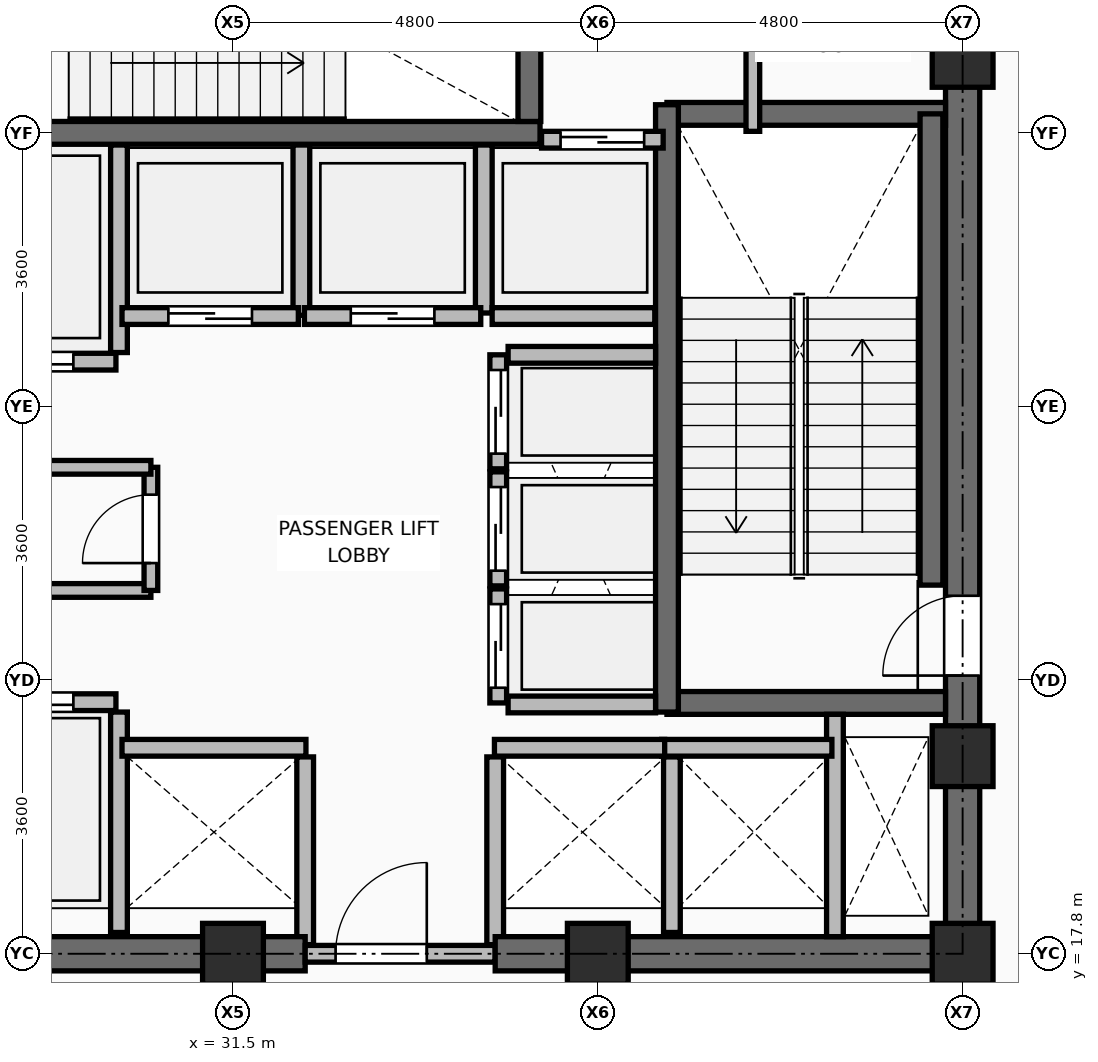
"""IFC4 building model, lengths in metres.
Left out: names, types, materials, properties, quantities, classifications, styles, units other than length and angle.
Written with IfcOpenShell. Run it as: python <this file> out.ifc"""

import sys

from ifc_helpers import new_model, si_unit, direction, frame, frame_2d, origin, origin_2d, place, context, subcontext, project, spatial, rectangle, extrude, element, fill, save


model = new_model("IFC4")
c1 = context("Model", 3, precision=1e-05, world=origin(), true_north=direction((0.0, 1.0)))
c2 = subcontext(c1, "Body", "Model", "MODEL_VIEW")
j1 = project(units=[si_unit("LENGTHUNIT", "METRE"), si_unit("PLANEANGLEUNIT", "RADIAN")], contexts=[c1])
p1 = place(None, origin())
s1 = spatial("IfcSite", under=j1, at=p1, CompositionType="ELEMENT")
p2 = place(p1, origin())
s2 = spatial("IfcBuilding", under=s1, at=p2, CompositionType="ELEMENT")
p3 = place(p2, frame((0.0, 0.0, 181.35)))
s3 = spatial("IfcBuildingStorey", under=s2, at=p3, CompositionType="ELEMENT", Elevation=181.35)
for number, where, z_axis, x_axis in (
    (1, (31.5, 17.8, 0.0), (0.0, 0.0, 1.0), (1.0, 0.0, 0.0)),
    (2, (36.3, 17.8, 0.0), (0.0, 0.0, 1.0), (1.0, 0.0, 0.0)),
    (3, (41.1, 17.8, 0.0), (0.0, 0.0, 1.0), (1.0, 0.0, 0.0)),
    (4, (41.1, 20.4, 0.0), (0.0, 0.0, 1.0), (1.0, 0.0, 0.0)),
    (5, (41.1, 29.6, 0.0), (0.0, 0.0, 1.0), (1.0, 0.0, 0.0)),
):
    element("IfcColumn", number, at=place(p3, frame(where, z_axis=z_axis, x_axis=x_axis)), inside=s3, PredefinedType="COLUMN", context=c2, shape_type="SweptSolid", body=[
        extrude(rectangle(XDim=0.8, YDim=0.8, at=origin_2d()), origin(), (0.0, 0.0, 1.0), 4.8),
    ])
p4 = place(p3, frame((30.0, 18.08, 0.0), z_axis=(0.0, 0.0, 1.0), x_axis=(0.0, 1.0, 0.0)))
e6 = element("IfcWall", 6, at=p4, inside=s3, PredefinedType="PARTITIONING", context=c2, shape_type="SweptSolid", body=[
    extrude(rectangle(XDim=2.9, YDim=0.22, at=frame_2d((1.45, 0.0))), origin(), (0.0, 0.0, 1.0), 4.595),
])
for number, where, z_axis, x_axis in (
    (7, (32.45, 17.92, 0.0), (0.0, 0.0, 1.0), (0.0, 1.0, 0.0)),
    (8, (34.95, 17.92, 0.0), (0.0, 0.0, 1.0), (0.0, 1.0, 0.0)),
):
    element("IfcWall", number, at=place(p3, frame(where, z_axis=z_axis, x_axis=x_axis)), inside=s3, PredefinedType="PARTITIONING", context=c2, shape_type="SweptSolid", body=[
        extrude(rectangle(XDim=2.47, YDim=0.22, at=frame_2d((1.235, 0.0))), origin(), (0.0, 0.0, 1.0), 4.595),
    ])
p5 = place(p3, frame((37.275, 18.08, 0.0), z_axis=(0.0, 0.0, 1.0), x_axis=(0.0, 1.0, 0.0)))
e9 = element("IfcWall", 9, at=p5, inside=s3, PredefinedType="PARTITIONING", context=c2, shape_type="SweptSolid", body=[
    extrude(rectangle(XDim=2.31, YDim=0.22, at=frame_2d((1.155, 0.0))), origin(), (0.0, 0.0, 1.0), 4.595),
])
p6 = place(p3, frame((30.0, 25.71, 0.0), z_axis=(0.0, 0.0, 1.0), x_axis=(0.0, 1.0, 0.0)))
e10 = element("IfcWall", 10, at=p6, inside=s3, PredefinedType="PARTITIONING", context=c2, shape_type="SweptSolid", body=[
    extrude(rectangle(XDim=2.73, YDim=0.22, at=frame_2d((1.365, 0.0))), origin(), (0.0, 0.0, 1.0), 4.595),
])
p7 = place(p3, frame((32.4, 26.2, 0.0), z_axis=(0.0, 0.0, 1.0), x_axis=(0.0, 1.0, 0.0)))
e11 = element("IfcWall", 11, at=p7, inside=s3, PredefinedType="PARTITIONING", context=c2, shape_type="SweptSolid", body=[
    extrude(rectangle(XDim=2.24, YDim=0.22, at=frame_2d((1.12, 0.0))), origin(), (0.0, 0.0, 1.0), 4.595),
])
p8 = place(p3, frame((34.8, 26.23, 0.0), z_axis=(0.0, 0.0, 1.0), x_axis=(0.0, 1.0, 0.0)))
e12 = element("IfcWall", 12, at=p8, inside=s3, PredefinedType="PARTITIONING", context=c2, shape_type="SweptSolid", body=[
    extrude(rectangle(XDim=2.21, YDim=0.22, at=frame_2d((1.105, 0.0))), origin(), (0.0, 0.0, 1.0), 4.595),
])
p9 = place(p3, frame((34.91, 26.19, 0.0), z_axis=(0.0, 0.0, 1.0), x_axis=(1.0, 0.0, 0.0)))
e13 = element("IfcWall", 13, at=p9, inside=s3, PredefinedType="PARTITIONING", context=c2, shape_type="SweptSolid", body=[
    extrude(rectangle(XDim=2.14, YDim=0.22, at=frame_2d((1.07, 0.0))), origin(), (0.0, 0.0, 1.0), 4.595),
])
p10 = place(p3, frame((25.55, 17.8, 0.0), z_axis=(0.0, 0.0, 1.0), x_axis=(1.0, 0.0, 0.0)))
e14 = element("IfcWall", 14, at=p10, inside=s3, PredefinedType="SHEAR", context=c2, shape_type="SweptSolid", body=[
    extrude(rectangle(XDim=6.9, YDim=0.45, at=frame_2d((3.45, 0.0))), origin(), (0.0, 0.0, 1.0), 4.62),
])
p11 = place(p3, frame((32.45, 17.8, 0.0), z_axis=(0.0, 0.0, 1.0), x_axis=(1.0, 0.0, 0.0)))
e15 = element("IfcWall", 15, at=p11, inside=s3, PredefinedType="PARTITIONING", context=c2, shape_type="SweptSolid", body=[
    extrude(rectangle(XDim=2.5, YDim=0.22, at=frame_2d((1.25, 0.0))), origin(), (0.0, 0.0, 1.0), 4.131),
])
p12 = place(p11, frame((0.4, 0.0, 0.0)))
e16 = element("IfcOpeningElement", 16, at=p12, cuts=e15, PredefinedType="OPENING", context=c2, shape_type="SweptSolid", body=[
    extrude(rectangle(XDim=1.2, YDim=2.1, at=frame_2d((0.6, 1.05))), frame((0.0, 0.12, 0.0), z_axis=(0.0, -1.0, 0.0), x_axis=(1.0, 0.0, 0.0)), (0.0, 0.0, 1.0), 0.24),
])
p13 = place(p3, frame((34.95, 17.8, 0.0), z_axis=(0.0, 0.0, 1.0), x_axis=(1.0, 0.0, 0.0)))
e17 = element("IfcWall", 17, at=p13, inside=s3, PredefinedType="SHEAR", context=c2, shape_type="SweptSolid", body=[
    extrude(rectangle(XDim=6.375, YDim=0.45, at=frame_2d((3.188, 0.0))), origin(), (0.0, 0.0, 1.0), 4.62),
])
p14 = place(p3, frame((41.1, 18.025, 0.0), z_axis=(0.0, 0.0, 1.0), x_axis=(0.0, 1.0, 0.0)))
e18 = element("IfcWall", 18, at=p14, inside=s3, PredefinedType="SHEAR", context=c2, shape_type="SweptSolid", body=[
    extrude(rectangle(XDim=14.2, YDim=0.45, at=frame_2d((7.1, 0.0))), origin(), (0.0, 0.0, 1.0), 4.62),
])
p15 = place(p14, frame((3.435, 0.0, 0.0)))
e19 = element("IfcOpeningElement", 19, at=p15, cuts=e18, PredefinedType="OPENING", context=c2, shape_type="SweptSolid", body=[
    extrude(rectangle(XDim=1.05, YDim=2.1, at=frame_2d((0.525, 1.05))), frame((0.0, 0.235, 0.0), z_axis=(0.0, -1.0, 0.0), x_axis=(1.0, 0.0, 0.0)), (0.0, 0.0, 1.0), 0.47),
])
for number, where, z_axis, x_axis in (
    (20, (37.21, 21.1, 0.0), (0.0, 0.0, 1.0), (1.0, 0.0, 0.0)),
    (21, (37.21, 28.85, 0.0), (0.0, 0.0, 1.0), (1.0, 0.0, 0.0)),
):
    element("IfcWall", number, at=place(p3, frame(where, z_axis=z_axis, x_axis=x_axis)), inside=s3, PredefinedType="SHEAR", context=c2, shape_type="SweptSolid", body=[
        extrude(rectangle(XDim=3.665, YDim=0.3, at=frame_2d((1.833, 0.0))), origin(), (0.0, 0.0, 1.0), 4.62),
    ])
p16 = place(p3, frame((37.21, 20.98, 0.0), z_axis=(0.0, 0.0, 1.0), x_axis=(0.0, 1.0, 0.0)))
e22 = element("IfcWall", 22, at=p16, inside=s3, PredefinedType="SHEAR", context=c2, shape_type="SweptSolid", body=[
    extrude(rectangle(XDim=7.99, YDim=0.3, at=frame_2d((3.995, 0.0))), origin(), (0.0, 0.0, 1.0), 4.62),
])
p17 = place(p3, frame((40.69, 22.65, 0.0), z_axis=(0.0, 0.0, 1.0), x_axis=(0.0, 1.0, 0.0)))
e23 = element("IfcWall", 23, at=p17, inside=s3, PredefinedType="SHEAR", context=c2, shape_type="SweptSolid", body=[
    extrude(rectangle(XDim=6.2, YDim=0.3, at=frame_2d((3.1, 0.0))), origin(), (0.0, 0.0, 1.0), 4.62),
])
p18 = place(p3, frame((27.51, 28.6, 0.0), z_axis=(0.0, 0.0, 1.0), x_axis=(1.0, 0.0, 0.0)))
e24 = element("IfcWall", 24, at=p18, inside=s3, PredefinedType="SHEAR", context=c2, shape_type="SweptSolid", body=[
    extrude(rectangle(XDim=8.03, YDim=0.3, at=frame_2d((4.015, 0.0))), origin(), (0.0, 0.0, 1.0), 4.62),
])
p19 = place(p3, frame((35.4, 28.75, 0.0), z_axis=(0.0, 0.0, 1.0), x_axis=(0.0, 1.0, 0.0)))
e25 = element("IfcWall", 25, at=p19, inside=s3, PredefinedType="SHEAR", context=c2, shape_type="SweptSolid", body=[
    extrude(rectangle(XDim=3.475, YDim=0.3, at=frame_2d((1.738, 0.0))), origin(), (0.0, 0.0, 1.0), 4.62),
])
p20 = place(p3, frame((39.42, 18.025, 0.0), z_axis=(0.0, 0.0, 1.0), x_axis=(0.0, 1.0, 0.0)))
e26 = element("IfcWall", 26, at=p20, inside=s3, PredefinedType="PARTITIONING", context=c2, shape_type="SweptSolid", body=[
    extrude(rectangle(XDim=2.925, YDim=0.22, at=frame_2d((1.462, 0.0))), origin(), (0.0, 0.0, 1.0), 4.6),
])
p21 = place(p3, frame((27.74, 21.11, 0.0), z_axis=(0.0, 0.0, 1.0), x_axis=(1.0, 0.0, 0.0)))
e27 = element("IfcWall", 27, at=p21, inside=s3, PredefinedType="PARTITIONING", context=c2, shape_type="SweptSolid", body=[
    extrude(rectangle(XDim=2.22, YDim=0.22, at=frame_2d((1.11, 0.0))), origin(), (0.0, 0.0, 1.0), 4.6),
])
p22 = place(p21, frame((0.56, 0.0, 0.0)))
e28 = element("IfcOpeningElement", 28, at=p22, cuts=e27, PredefinedType="OPENING", context=c2, shape_type="SweptSolid", body=[
    extrude(rectangle(XDim=1.1, YDim=2.2, at=frame_2d((0.55, 1.1))), frame((0.0, 0.12, 0.0), z_axis=(0.0, -1.0, 0.0), x_axis=(1.0, 0.0, 0.0)), (0.0, 0.0, 1.0), 0.24),
])
p23 = place(p3, frame((27.74, 25.59, 0.0), z_axis=(0.0, 0.0, 1.0), x_axis=(1.0, 0.0, 0.0)))
e29 = element("IfcWall", 29, at=p23, inside=s3, PredefinedType="PARTITIONING", context=c2, shape_type="SweptSolid", body=[
    extrude(rectangle(XDim=2.22, YDim=0.22, at=frame_2d((1.11, 0.0))), origin(), (0.0, 0.0, 1.0), 4.6),
])
p24 = place(p23, frame((0.56, 0.0, 0.0)))
e30 = element("IfcOpeningElement", 30, at=p24, cuts=e29, PredefinedType="OPENING", context=c2, shape_type="SweptSolid", body=[
    extrude(rectangle(XDim=1.1, YDim=2.2, at=frame_2d((0.55, 1.1))), frame((0.0, 0.12, 0.0), z_axis=(0.0, -1.0, 0.0), x_axis=(1.0, 0.0, 0.0)), (0.0, 0.0, 1.0), 0.24),
])
p25 = place(p3, frame((30.04, 20.51, 0.0), z_axis=(0.0, 0.0, 1.0), x_axis=(1.0, 0.0, 0.0)))
e31 = element("IfcWall", 31, at=p25, inside=s3, PredefinedType="PARTITIONING", context=c2, shape_type="SweptSolid", body=[
    extrude(rectangle(XDim=2.42, YDim=0.22, at=frame_2d((1.21, 0.0))), origin(), (0.0, 0.0, 1.0), 4.6),
])
for number, where, z_axis, x_axis in (
    (32, (37.14, 20.51, 0.0), (0.0, 0.0, 1.0), (1.0, 0.0, 0.0)),
    (33, (34.94, 20.51, 0.0), (0.0, 0.0, 1.0), (1.0, 0.0, 0.0)),
):
    element("IfcWall", number, at=place(p3, frame(where, z_axis=z_axis, x_axis=x_axis)), inside=s3, PredefinedType="PARTITIONING", context=c2, shape_type="SweptSolid", body=[
        extrude(rectangle(XDim=2.24, YDim=0.22, at=frame_2d((1.12, 0.0))), origin(), (0.0, 0.0, 1.0), 4.6),
    ])
p26 = place(p3, frame((30.04, 26.19, 0.0), z_axis=(0.0, 0.0, 1.0), x_axis=(1.0, 0.0, 0.0)))
e34 = element("IfcWall", 34, at=p26, inside=s3, PredefinedType="PARTITIONING", context=c2, shape_type="SweptSolid", body=[
    extrude(rectangle(XDim=2.32, YDim=0.22, at=frame_2d((1.16, 0.0))), origin(), (0.0, 0.0, 1.0), 4.6),
])
p27 = place(p26, frame((0.61, 0.0, 0.0)))
e35 = element("IfcOpeningElement", 35, at=p27, cuts=e34, PredefinedType="OPENING", context=c2, shape_type="SweptSolid", body=[
    extrude(rectangle(XDim=1.1, YDim=2.2, at=frame_2d((0.55, 1.1))), frame((0.0, 0.12, 0.0), z_axis=(0.0, -1.0, 0.0), x_axis=(1.0, 0.0, 0.0)), (0.0, 0.0, 1.0), 0.24),
])
p28 = place(p3, frame((32.44, 26.19, 0.0), z_axis=(0.0, 0.0, 1.0), x_axis=(1.0, 0.0, 0.0)))
e36 = element("IfcWall", 36, at=p28, inside=s3, PredefinedType="PARTITIONING", context=c2, shape_type="SweptSolid", body=[
    extrude(rectangle(XDim=2.32, YDim=0.22, at=frame_2d((1.16, 0.0))), origin(), (0.0, 0.0, 1.0), 4.6),
])
p29 = place(p28, frame((0.61, 0.0, 0.0)))
e37 = element("IfcOpeningElement", 37, at=p29, cuts=e36, PredefinedType="OPENING", context=c2, shape_type="SweptSolid", body=[
    extrude(rectangle(XDim=1.1, YDim=2.2, at=frame_2d((0.55, 1.1))), frame((0.0, 0.12, 0.0), z_axis=(0.0, -1.0, 0.0), x_axis=(1.0, 0.0, 0.0)), (0.0, 0.0, 1.0), 0.24),
])
p30 = place(p3, frame((35.56, 28.51, 0.0), z_axis=(0.0, 0.0, 1.0), x_axis=(1.0, 0.0, 0.0)))
e38 = element("IfcWall", 38, at=p30, inside=s3, PredefinedType="PARTITIONING", context=c2, shape_type="SweptSolid", body=[
    extrude(rectangle(XDim=1.6, YDim=0.22, at=frame_2d((0.8, 0.0))), origin(), (0.0, 0.0, 1.0), 4.6),
])
p31 = place(p30, frame((0.25, 0.0, 0.0)))
e39 = element("IfcOpeningElement", 39, at=p31, cuts=e38, PredefinedType="OPENING", context=c2, shape_type="SweptSolid", body=[
    extrude(rectangle(XDim=1.1, YDim=2.2, at=frame_2d((0.55, 1.1))), frame((0.0, 0.12, 0.0), z_axis=(0.0, -1.0, 0.0), x_axis=(1.0, 0.0, 0.0)), (0.0, 0.0, 1.0), 0.24),
])
p32 = place(p3, frame((34.99, 21.1, 0.0), z_axis=(0.0, 0.0, 1.0), x_axis=(0.0, 1.0, 0.0)))
e40 = element("IfcWall", 40, at=p32, inside=s3, PredefinedType="PARTITIONING", context=c2, shape_type="SweptSolid", body=[
    extrude(rectangle(XDim=1.5, YDim=0.22, at=frame_2d((0.75, 0.0))), origin(), (0.0, 0.0, 1.0), 4.6),
])
p33 = place(p32, frame((0.2, 0.0, 0.0)))
e41 = element("IfcOpeningElement", 41, at=p33, cuts=e40, PredefinedType="OPENING", context=c2, shape_type="SweptSolid", body=[
    extrude(rectangle(XDim=1.1, YDim=2.2, at=frame_2d((0.55, 1.1))), frame((0.0, 0.12, 0.0), z_axis=(0.0, -1.0, 0.0), x_axis=(1.0, 0.0, 0.0)), (0.0, 0.0, 1.0), 0.24),
])
p34 = place(p3, frame((34.99, 22.64, 0.0), z_axis=(0.0, 0.0, 1.0), x_axis=(0.0, 1.0, 0.0)))
e42 = element("IfcWall", 42, at=p34, inside=s3, PredefinedType="PARTITIONING", context=c2, shape_type="SweptSolid", body=[
    extrude(rectangle(XDim=1.5, YDim=0.22, at=frame_2d((0.75, 0.0))), origin(), (0.0, 0.0, 1.0), 4.6),
])
p35 = place(p34, frame((0.2, 0.0, 0.0)))
e43 = element("IfcOpeningElement", 43, at=p35, cuts=e42, PredefinedType="OPENING", context=c2, shape_type="SweptSolid", body=[
    extrude(rectangle(XDim=1.1, YDim=2.2, at=frame_2d((0.55, 1.1))), frame((0.0, 0.12, 0.0), z_axis=(0.0, -1.0, 0.0), x_axis=(1.0, 0.0, 0.0)), (0.0, 0.0, 1.0), 0.24),
])
p36 = place(p3, frame((34.99, 24.18, 0.0), z_axis=(0.0, 0.0, 1.0), x_axis=(0.0, 1.0, 0.0)))
e44 = element("IfcWall", 44, at=p36, inside=s3, PredefinedType="PARTITIONING", context=c2, shape_type="SweptSolid", body=[
    extrude(rectangle(XDim=1.5, YDim=0.22, at=frame_2d((0.75, 0.0))), origin(), (0.0, 0.0, 1.0), 4.6),
])
p37 = place(p36, frame((0.2, 0.0, 0.0)))
e45 = element("IfcOpeningElement", 45, at=p37, cuts=e44, PredefinedType="OPENING", context=c2, shape_type="SweptSolid", body=[
    extrude(rectangle(XDim=1.1, YDim=2.2, at=frame_2d((0.55, 1.1))), frame((0.0, 0.12, 0.0), z_axis=(0.0, -1.0, 0.0), x_axis=(1.0, 0.0, 0.0)), (0.0, 0.0, 1.0), 0.24),
])
for number, where, z_axis, x_axis in (
    (46, (35.12, 21.08, 0.0), (0.0, 0.0, 1.0), (1.0, 0.0, 0.0)),
    (47, (35.12, 25.68, 0.0), (0.0, 0.0, 1.0), (1.0, 0.0, 0.0)),
):
    element("IfcWall", number, at=place(p3, frame(where, z_axis=z_axis, x_axis=x_axis)), inside=s3, PredefinedType="PARTITIONING", context=c2, shape_type="SweptSolid", body=[
        extrude(rectangle(XDim=1.94, YDim=0.22, at=frame_2d((0.97, 0.0))), origin(), (0.0, 0.0, 1.0), 4.6),
    ])
p38 = place(p3, frame((27.68, 22.58, 0.0), z_axis=(0.0, 0.0, 1.0), x_axis=(1.0, 0.0, 0.0)))
e48 = element("IfcWall", 48, at=p38, inside=s3, PredefinedType="PARTITIONING", context=c2, shape_type="SweptSolid", body=[
    extrude(rectangle(XDim=2.74, YDim=0.18, at=frame_2d((1.37, 0.0))), origin(), (0.0, 0.0, 1.0), 4.6),
])
p39 = place(p3, frame((30.42, 22.58, 0.0), z_axis=(0.0, 0.0, 1.0), x_axis=(0.0, 1.0, 0.0)))
e49 = element("IfcWall", 49, at=p39, inside=s3, PredefinedType="PARTITIONING", context=c2, shape_type="SweptSolid", body=[
    extrude(rectangle(XDim=1.62, YDim=0.18, at=frame_2d((0.81, 0.0))), origin(), (0.0, 0.0, 1.0), 4.6),
])
p40 = place(p39, frame((0.36, 0.0, 0.0)))
e50 = element("IfcOpeningElement", 50, at=p40, cuts=e49, PredefinedType="OPENING", context=c2, shape_type="SweptSolid", body=[
    extrude(rectangle(XDim=0.9, YDim=2.1, at=frame_2d((0.45, 1.05))), frame((0.0, 0.1, 0.0), z_axis=(0.0, -1.0, 0.0), x_axis=(1.0, 0.0, 0.0)), (0.0, 0.0, 1.0), 0.2),
])
p41 = place(p3, frame((27.68, 24.2, 0.0), z_axis=(0.0, 0.0, 1.0), x_axis=(1.0, 0.0, 0.0)))
e51 = element("IfcWall", 51, at=p41, inside=s3, PredefinedType="PARTITIONING", context=c2, shape_type="SweptSolid", body=[
    extrude(rectangle(XDim=2.74, YDim=0.18, at=frame_2d((1.37, 0.0))), origin(), (0.0, 0.0, 1.0), 4.6),
])
p42 = place(p3, frame((38.34, 28.62, 0.0), z_axis=(0.0, 0.0, 1.0), x_axis=(0.0, 1.0, 0.0)))
e52 = element("IfcWall", 52, at=p42, inside=s3, PredefinedType="PARTITIONING", context=c2, shape_type="SweptSolid", body=[
    extrude(rectangle(XDim=3.605, YDim=0.18, at=frame_2d((1.802, 0.0))), origin(), (0.0, 0.0, 1.0), 4.6),
])
p43 = place(p12, origin())
e53 = element("IfcDoor", 53, at=p43, inside=s3, OperationType="SINGLE_SWING_RIGHT", PredefinedType="DOOR", context=c2, shape_type="SweptSolid", body=[
    extrude(rectangle(XDim=1.2, YDim=2.1, at=frame_2d((0.6, 1.05))), frame((0.0, 0.025, 0.0), z_axis=(0.0, -1.0, 0.0), x_axis=(1.0, 0.0, 0.0)), (0.0, 0.0, 1.0), 0.05),
])
fill(e16, e53)
p44 = place(p15, origin())
e54 = element("IfcDoor", 54, at=p44, inside=s3, OperationType="SINGLE_SWING_LEFT", PredefinedType="DOOR", context=c2, shape_type="SweptSolid", body=[
    extrude(rectangle(XDim=1.05, YDim=2.1, at=frame_2d((0.525, 1.05))), frame((0.0, 0.025, 0.0), z_axis=(0.0, -1.0, 0.0), x_axis=(1.0, 0.0, 0.0)), (0.0, 0.0, 1.0), 0.05),
])
fill(e19, e54)
p45 = place(p22, origin())
e55 = element("IfcDoor", 55, at=p45, inside=s3, OperationType="DOUBLE_DOOR_SLIDING", PredefinedType="DOOR", context=c2, shape_type="SweptSolid", body=[
    extrude(rectangle(XDim=1.1, YDim=2.2, at=frame_2d((0.55, 1.1))), frame((0.0, 0.025, 0.0), z_axis=(0.0, -1.0, 0.0), x_axis=(1.0, 0.0, 0.0)), (0.0, 0.0, 1.0), 0.05),
])
fill(e28, e55)
p46 = place(p24, frame((1.1, 0.0, 0.0), z_axis=(0.0, 0.0, 1.0), x_axis=(-1.0, 0.0, 0.0)))
e56 = element("IfcDoor", 56, at=p46, inside=s3, OperationType="DOUBLE_DOOR_SLIDING", PredefinedType="DOOR", context=c2, shape_type="SweptSolid", body=[
    extrude(rectangle(XDim=1.1, YDim=2.2, at=frame_2d((0.55, 1.1))), frame((0.0, 0.025, 0.0), z_axis=(0.0, -1.0, 0.0), x_axis=(1.0, 0.0, 0.0)), (0.0, 0.0, 1.0), 0.05),
])
fill(e30, e56)
p47 = place(p27, frame((1.1, 0.0, 0.0), z_axis=(0.0, 0.0, 1.0), x_axis=(-1.0, 0.0, 0.0)))
e57 = element("IfcDoor", 57, at=p47, inside=s3, OperationType="DOUBLE_DOOR_SLIDING", PredefinedType="DOOR", context=c2, shape_type="SweptSolid", body=[
    extrude(rectangle(XDim=1.1, YDim=2.2, at=frame_2d((0.55, 1.1))), frame((0.0, 0.025, 0.0), z_axis=(0.0, -1.0, 0.0), x_axis=(1.0, 0.0, 0.0)), (0.0, 0.0, 1.0), 0.05),
])
fill(e35, e57)
p48 = place(p29, frame((1.1, 0.0, 0.0), z_axis=(0.0, 0.0, 1.0), x_axis=(-1.0, 0.0, 0.0)))
e58 = element("IfcDoor", 58, at=p48, inside=s3, OperationType="DOUBLE_DOOR_SLIDING", PredefinedType="DOOR", context=c2, shape_type="SweptSolid", body=[
    extrude(rectangle(XDim=1.1, YDim=2.2, at=frame_2d((0.55, 1.1))), frame((0.0, 0.025, 0.0), z_axis=(0.0, -1.0, 0.0), x_axis=(1.0, 0.0, 0.0)), (0.0, 0.0, 1.0), 0.05),
])
fill(e37, e58)
p49 = place(p31, origin())
e59 = element("IfcDoor", 59, at=p49, inside=s3, OperationType="DOUBLE_DOOR_SLIDING", PredefinedType="DOOR", context=c2, shape_type="SweptSolid", body=[
    extrude(rectangle(XDim=1.1, YDim=2.2, at=frame_2d((0.55, 1.1))), frame((0.0, 0.025, 0.0), z_axis=(0.0, -1.0, 0.0), x_axis=(1.0, 0.0, 0.0)), (0.0, 0.0, 1.0), 0.05),
])
fill(e39, e59)
p50 = place(p33, origin())
e60 = element("IfcDoor", 60, at=p50, inside=s3, OperationType="DOUBLE_DOOR_SLIDING", PredefinedType="DOOR", context=c2, shape_type="SweptSolid", body=[
    extrude(rectangle(XDim=1.1, YDim=2.2, at=frame_2d((0.55, 1.1))), frame((0.0, 0.025, 0.0), z_axis=(0.0, -1.0, 0.0), x_axis=(1.0, 0.0, 0.0)), (0.0, 0.0, 1.0), 0.05),
])
fill(e41, e60)
p51 = place(p35, origin())
e61 = element("IfcDoor", 61, at=p51, inside=s3, OperationType="DOUBLE_DOOR_SLIDING", PredefinedType="DOOR", context=c2, shape_type="SweptSolid", body=[
    extrude(rectangle(XDim=1.1, YDim=2.2, at=frame_2d((0.55, 1.1))), frame((0.0, 0.025, 0.0), z_axis=(0.0, -1.0, 0.0), x_axis=(1.0, 0.0, 0.0)), (0.0, 0.0, 1.0), 0.05),
])
fill(e43, e61)
p52 = place(p37, origin())
e62 = element("IfcDoor", 62, at=p52, inside=s3, OperationType="DOUBLE_DOOR_SLIDING", PredefinedType="DOOR", context=c2, shape_type="SweptSolid", body=[
    extrude(rectangle(XDim=1.1, YDim=2.2, at=frame_2d((0.55, 1.1))), frame((0.0, 0.025, 0.0), z_axis=(0.0, -1.0, 0.0), x_axis=(1.0, 0.0, 0.0)), (0.0, 0.0, 1.0), 0.05),
])
fill(e45, e62)
p53 = place(p40, origin())
e63 = element("IfcDoor", 63, at=p53, inside=s3, OperationType="SINGLE_SWING_LEFT", PredefinedType="DOOR", context=c2, shape_type="SweptSolid", body=[
    extrude(rectangle(XDim=0.9, YDim=2.1, at=frame_2d((0.45, 1.05))), frame((0.0, 0.025, 0.0), z_axis=(0.0, -1.0, 0.0), x_axis=(1.0, 0.0, 0.0)), (0.0, 0.0, 1.0), 0.05),
])
fill(e50, e63)
save(model, sys.argv[1])
